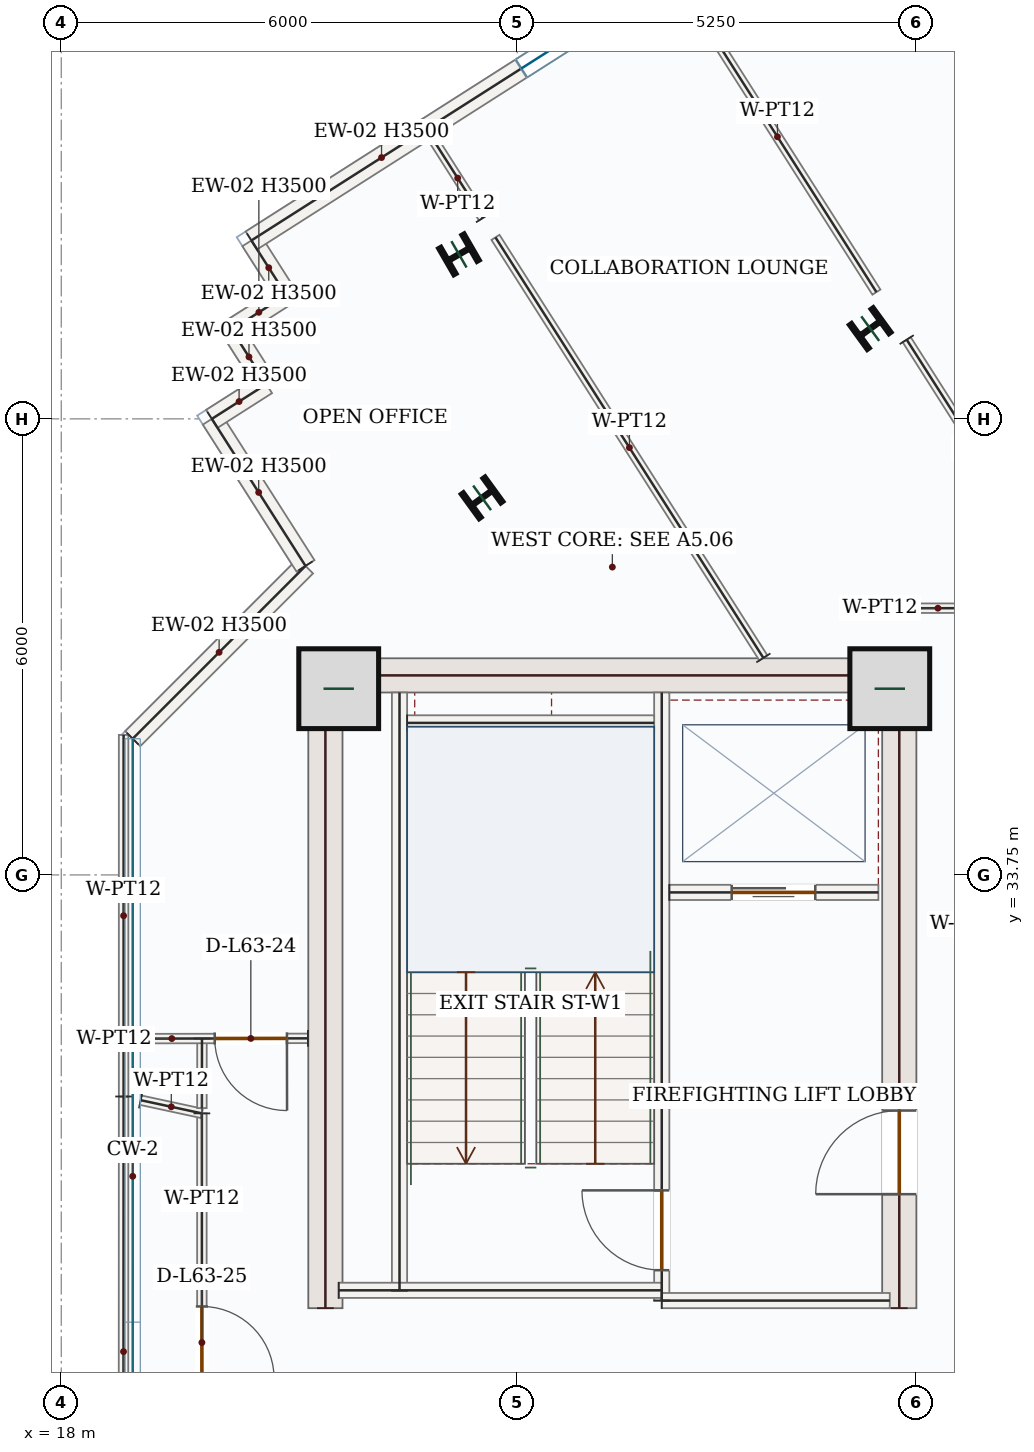
"""IFC4 building model, lengths in metres.
Left out: names, types, materials, properties, quantities, classifications, styles, units other than length and angle.
Written with IfcOpenShell. Run it as: python <this file> out.ifc"""

import sys

from ifc_helpers import new_model, si_unit, direction, frame, frame_2d, origin, origin_2d, place, context, subcontext, project, spatial, rectangle, i_section, extrude, source, transform, mapped, element, fill, save


model = new_model("IFC4")
c1 = context("Model", 3, precision=1e-05, world=origin(), true_north=direction((0.0, 1.0)))
c2 = subcontext(c1, "Body", "Model", "MODEL_VIEW")
j1 = project(units=[si_unit("LENGTHUNIT", "METRE"), si_unit("PLANEANGLEUNIT", "RADIAN")], contexts=[c1])
p1 = place(None, origin())
s1 = spatial("IfcSite", under=j1, at=p1, CompositionType="ELEMENT")
p2 = place(p1, origin())
s2 = spatial("IfcBuilding", under=s1, at=p2, CompositionType="ELEMENT")
p3 = place(p2, frame((0.0, 0.0, 265.35)))
s3 = spatial("IfcBuildingStorey", under=s2, at=p3, CompositionType="ELEMENT", Elevation=265.35)
m1 = source(origin(), c2, "Body", "SweptSolid", [
    extrude(rectangle(XDim=8.55, YDim=0.45, at=frame_2d((4.275, 0.0))), origin(), (0.0, 0.0, 1.0), 3.5),
])
p4 = place(p3, frame((21.475, 28.05, 0.0), z_axis=(0.0, 0.0, 1.0), x_axis=(0.0, 1.0, 0.0)))
e1 = element("IfcWall", 1, at=p4, inside=s3, PredefinedType="SHEAR", context=c2, shape_type="MappedRepresentation", body=[
    mapped(m1, transform((0.0, 0.0, 0.0), x_axis=(1.0, 0.0, 0.0), y_axis=(0.0, 1.0, 0.0), z_axis=(0.0, 0.0, 1.0), scale=1.0)),
])
p5 = place(p3, frame((29.025, 28.05, 0.0), z_axis=(0.0, 0.0, 1.0), x_axis=(0.0, 1.0, 0.0)))
e2 = element("IfcWall", 2, at=p5, inside=s3, PredefinedType="SHEAR", context=c2, shape_type="SweptSolid", body=[
    extrude(rectangle(XDim=8.55, YDim=0.45, at=frame_2d((4.275, 0.0))), origin(), (0.0, 0.0, 1.0), 3.5),
])
p6 = place(p5, frame((1.5, 0.0, 0.0)))
e3 = element("IfcOpeningElement", 3, at=p6, cuts=e2, PredefinedType="OPENING", context=c2, shape_type="SweptSolid", body=[
    extrude(rectangle(XDim=1.1, YDim=2.2, at=frame_2d((0.55, 1.1))), frame((0.0, 0.235, 0.0), z_axis=(0.0, -1.0, 0.0), x_axis=(1.0, 0.0, 0.0)), (0.0, 0.0, 1.0), 0.47),
])
m2 = source(origin(), c2, "Body", "SweptSolid", [
    extrude(rectangle(XDim=7.1, YDim=0.45, at=frame_2d((3.55, 0.0))), origin(), (0.0, 0.0, 1.0), 3.5),
])
p7 = place(p3, frame((21.7, 36.375, 0.0), z_axis=(0.0, 0.0, 1.0), x_axis=(1.0, 0.0, 0.0)))
e4 = element("IfcWall", 4, at=p7, inside=s3, PredefinedType="SHEAR", context=c2, shape_type="MappedRepresentation", body=[
    mapped(m2, transform((0.0, 0.0, 0.0), x_axis=(1.0, 0.0, 0.0), y_axis=(0.0, 1.0, 0.0), z_axis=(0.0, 0.0, 1.0), scale=1.0)),
])
m3 = source(origin(), c2, "Body", "SweptSolid", [
    extrude(rectangle(XDim=1.05, YDim=1.05, at=origin_2d()), origin(), (0.0, 0.0, 1.0), 3.75),
])
for number, where, z_axis, x_axis in (
    (5, (21.65, 36.2, 0.0), (0.0, 0.0, 1.0), (1.0, 0.0, 0.0)),
    (6, (28.9, 36.2, 0.0), (0.0, 0.0, 1.0), (1.0, 0.0, 0.0)),
):
    element("IfcColumn", number, at=place(p3, frame(where, z_axis=z_axis, x_axis=x_axis)), inside=s3, PredefinedType="COLUMN", context=c2, shape_type="MappedRepresentation", body=[
        mapped(m3, transform((0.0, 0.0, 0.0), x_axis=(1.0, 0.0, 0.0), y_axis=(0.0, 1.0, 0.0), z_axis=(0.0, 0.0, 1.0), scale=1.0)),
    ])
m4 = source(origin(), c2, "Body", "SweptSolid", [
    extrude(i_section(OverallWidth=0.399, OverallDepth=0.386, WebThickness=0.021, FlangeThickness=0.033, FilletRadius=0.018, at=origin_2d()), origin(), (0.0, 0.0, 1.0), 3.75),
])
for number, where, z_axis, x_axis in (
    (7, (28.643, 40.937, 0.0), (0.0, 0.0, 1.0), (-0.588, 0.809, 0.0)),
    (8, (23.536, 38.711, 0.0), (0.0, 0.0, 1.0), (-0.588, 0.809, 0.0)),
    (9, (23.232, 41.914, 0.0), (0.0, 0.0, 1.0), (-0.5, 0.866, 0.0)),
):
    element("IfcColumn", number, at=place(p3, frame(where, z_axis=z_axis, x_axis=x_axis)), inside=s3, PredefinedType="COLUMN", context=c2, shape_type="MappedRepresentation", body=[
        mapped(m4, transform((0.0, 0.0, 0.0), x_axis=(1.0, 0.0, 0.0), y_axis=(0.0, 1.0, 0.0), z_axis=(0.0, 0.0, 1.0), scale=1.0)),
    ])
m5 = source(origin(), c2, "Body", "SweptSolid", [
    extrude(rectangle(XDim=3.215, YDim=0.28, at=frame_2d((1.607, 0.0))), origin(), (0.0, 0.0, 1.0), 3.5),
])
p8 = place(p3, frame((18.94, 35.542, 0.0), z_axis=(0.0, 0.0, 1.0), x_axis=(0.707106781187, 0.707106781187, 0.0)))
e10 = element("IfcWall", 10, at=p8, inside=s3, PredefinedType="SOLIDWALL", context=c2, shape_type="MappedRepresentation", body=[
    mapped(m5, transform((0.0, 0.0, 0.0), x_axis=(1.0, 0.0, 0.0), y_axis=(0.0, 1.0, 0.0), z_axis=(0.0, 0.0, 1.0), scale=1.0)),
])
m6 = source(origin(), c2, "Body", "SweptSolid", [
    extrude(rectangle(XDim=2.293, YDim=0.28, at=frame_2d((1.147, 0.0))), origin(), (0.0, 0.0, 1.0), 3.5),
])
p9 = place(p3, frame((21.213, 37.815, 0.0), z_axis=(0.0, 0.0, 1.0), x_axis=(-0.53726116654, 0.843415934713, 0.0)))
e11 = element("IfcWall", 11, at=p9, inside=s3, PredefinedType="SOLIDWALL", context=c2, shape_type="MappedRepresentation", body=[
    mapped(m6, transform((0.0, 0.0, 0.0), x_axis=(1.0, 0.0, 0.0), y_axis=(0.0, 1.0, 0.0), z_axis=(0.0, 0.0, 1.0), scale=1.0)),
])
m7 = source(origin(), c2, "Body", "SweptSolid", [
    extrude(rectangle(XDim=0.85, YDim=0.28, at=frame_2d((0.425, 0.0))), origin(), (0.0, 0.0, 1.0), 3.5),
])
for number, where, z_axis, x_axis in (
    (12, (19.981, 39.75, 0.0), (0.0, 0.0, 1.0), (0.843, 0.537, 0.0)),
    (13, (20.698, 40.206, 0.0), (0.0, 0.0, 1.0), (-0.537, 0.843, 0.0)),
    (14, (20.241, 40.923, 0.0), (0.0, 0.0, 1.0), (0.843, 0.537, 0.0)),
    (15, (20.958, 41.38, 0.0), (0.0, 0.0, 1.0), (-0.537, 0.843, 0.0)),
):
    element("IfcWall", number, at=place(p3, frame(where, z_axis=z_axis, x_axis=x_axis)), inside=s3, PredefinedType="SOLIDWALL", context=c2, shape_type="MappedRepresentation", body=[
        mapped(m7, transform((0.0, 0.0, 0.0), x_axis=(1.0, 0.0, 0.0), y_axis=(0.0, 1.0, 0.0), z_axis=(0.0, 0.0, 1.0), scale=1.0)),
    ])
p10 = place(p3, frame((20.501, 42.097, 0.0), z_axis=(0.0, 0.0, 1.0), x_axis=(0.843388777764, 0.537303796322, 0.0)))
e16 = element("IfcWall", 16, at=p10, inside=s3, PredefinedType="SOLIDWALL", context=c2, shape_type="SweptSolid", body=[
    extrude(rectangle(XDim=9.92, YDim=0.28, at=frame_2d((4.96, 0.0))), origin(), (0.0, 0.0, 1.0), 3.5),
])
p11 = place(p10, frame((4.21, 0.0, 0.85)))
e17 = element("IfcOpeningElement", 17, at=p11, cuts=e16, PredefinedType="OPENING", context=c2, shape_type="SweptSolid", body=[
    extrude(rectangle(XDim=1.5, YDim=1.5, at=frame_2d((0.75, 0.75))), frame((0.0, 0.15, 0.0), z_axis=(0.0, -1.0, 0.0), x_axis=(1.0, 0.0, 0.0)), (0.0, 0.0, 1.0), 0.3),
])
m8 = source(origin(), c2, "Body", "SweptSolid", [
    extrude(rectangle(XDim=7.87, YDim=0.2, at=frame_2d((3.935, 0.0))), origin(), (0.0, 0.0, 1.0), 3.5),
])
p12 = place(p3, frame((22.45, 28.28, 0.0), z_axis=(0.0, 0.0, 1.0), x_axis=(0.0, 1.0, 0.0)))
e18 = element("IfcWall", 18, at=p12, inside=s3, PredefinedType="SOLIDWALL", context=c2, shape_type="MappedRepresentation", body=[
    mapped(m8, transform((0.0, 0.0, 0.0), x_axis=(1.0, 0.0, 0.0), y_axis=(0.0, 1.0, 0.0), z_axis=(0.0, 0.0, 1.0), scale=1.0)),
])
p13 = place(p3, frame((25.9, 28.15, 0.0), z_axis=(0.0, 0.0, 1.0), x_axis=(0.0, 1.0, 0.0)))
e19 = element("IfcWall", 19, at=p13, inside=s3, PredefinedType="SOLIDWALL", context=c2, shape_type="SweptSolid", body=[
    extrude(rectangle(XDim=8.0, YDim=0.2, at=frame_2d((4.0, 0.0))), origin(), (0.0, 0.0, 1.0), 3.5),
])
p14 = place(p13, frame((0.4, 0.0, 0.0)))
e20 = element("IfcOpeningElement", 20, at=p14, cuts=e19, PredefinedType="OPENING", context=c2, shape_type="SweptSolid", body=[
    extrude(rectangle(XDim=1.05, YDim=2.15, at=frame_2d((0.525, 1.075))), frame((0.0, 0.11, 0.0), z_axis=(0.0, -1.0, 0.0), x_axis=(1.0, 0.0, 0.0)), (0.0, 0.0, 1.0), 0.22),
])
m9 = source(origin(), c2, "Body", "SweptSolid", [
    extrude(rectangle(XDim=4.25, YDim=0.2, at=frame_2d((2.125, 0.0))), origin(), (0.0, 0.0, 1.0), 3.5),
])
p15 = place(p3, frame((21.65, 28.285, 0.0), z_axis=(0.0, 0.0, 1.0), x_axis=(1.0, 0.0, 0.0)))
e21 = element("IfcWall", 21, at=p15, inside=s3, PredefinedType="SOLIDWALL", context=c2, shape_type="MappedRepresentation", body=[
    mapped(m9, transform((0.0, 0.0, 0.0), x_axis=(1.0, 0.0, 0.0), y_axis=(0.0, 1.0, 0.0), z_axis=(0.0, 0.0, 1.0), scale=1.0)),
])
m10 = source(origin(), c2, "Body", "SweptSolid", [
    extrude(rectangle(XDim=3.0, YDim=0.2, at=frame_2d((1.5, 0.0))), origin(), (0.0, 0.0, 1.0), 3.5),
])
p16 = place(p3, frame((25.9, 28.15, 0.0), z_axis=(0.0, 0.0, 1.0), x_axis=(1.0, 0.0, 0.0)))
e22 = element("IfcWall", 22, at=p16, inside=s3, PredefinedType="SOLIDWALL", context=c2, shape_type="MappedRepresentation", body=[
    mapped(m10, transform((0.0, 0.0, 0.0), x_axis=(1.0, 0.0, 0.0), y_axis=(0.0, 1.0, 0.0), z_axis=(0.0, 0.0, 1.0), scale=1.0)),
])
m11 = source(origin(), c2, "Body", "SweptSolid", [
    extrude(rectangle(XDim=3.25, YDim=0.2, at=frame_2d((1.625, 0.0))), origin(), (0.0, 0.0, 1.0), 3.5),
])
p17 = place(p3, frame((22.55, 35.75, 0.0), z_axis=(0.0, 0.0, 1.0), x_axis=(1.0, 0.0, 0.0)))
e23 = element("IfcWall", 23, at=p17, inside=s3, PredefinedType="SOLIDWALL", context=c2, shape_type="MappedRepresentation", body=[
    mapped(m11, transform((0.0, 0.0, 0.0), x_axis=(1.0, 0.0, 0.0), y_axis=(0.0, 1.0, 0.0), z_axis=(0.0, 0.0, 1.0), scale=1.0)),
])
p18 = place(p3, frame((26.0, 33.52, 0.0), z_axis=(0.0, 0.0, 1.0), x_axis=(1.0, 0.0, 0.0)))
e24 = element("IfcWall", 24, at=p18, inside=s3, PredefinedType="SOLIDWALL", context=c2, shape_type="SweptSolid", body=[
    extrude(rectangle(XDim=2.75, YDim=0.2, at=frame_2d((1.375, 0.0))), origin(), (0.0, 0.0, 1.0), 3.5),
])
p19 = place(p18, frame((0.82, 0.0, 0.0)))
e25 = element("IfcOpeningElement", 25, at=p19, cuts=e24, PredefinedType="OPENING", context=c2, shape_type="SweptSolid", body=[
    extrude(rectangle(XDim=1.1, YDim=2.15, at=frame_2d((0.55, 1.075))), frame((0.0, 0.11, 0.0), z_axis=(0.0, -1.0, 0.0), x_axis=(1.0, 0.0, 0.0)), (0.0, 0.0, 1.0), 0.22),
])
m12 = source(origin(), c2, "Body", "SweptSolid", [
    extrude(rectangle(XDim=4.188, YDim=0.125, at=frame_2d((2.094, 0.0))), origin(), (0.0, 0.0, 1.0), 3.5),
])
p20 = place(p3, frame((29.123, 40.792, 0.0), z_axis=(0.0, 0.0, 1.0), x_axis=(0.537264008944, -0.843414124078, 0.0)))
e26 = element("IfcWall", 26, at=p20, inside=s3, PredefinedType="PARTITIONING", context=c2, shape_type="MappedRepresentation", body=[
    mapped(m12, transform((0.0, 0.0, 0.0), x_axis=(1.0, 0.0, 0.0), y_axis=(0.0, 1.0, 0.0), z_axis=(0.0, 0.0, 1.0), scale=1.0)),
])
p21 = place(p3, frame((31.292, 37.26, 0.0), z_axis=(0.0, 0.0, 1.0), x_axis=(-0.999999820546, -0.000599089277, 0.0)))
e27 = element("IfcWall", 27, at=p21, inside=s3, PredefinedType="PARTITIONING", context=c2, shape_type="SweptSolid", body=[
    extrude(rectangle(XDim=2.038, YDim=0.125, at=frame_2d((1.019, 0.0))), origin(), (0.0, 0.0, 1.0), 3.5),
])
p22 = place(p21, frame((0.381, 0.0, 0.0)))
e28 = element("IfcOpeningElement", 28, at=p22, cuts=e27, PredefinedType="OPENING", context=c2, shape_type="SweptSolid", body=[
    extrude(rectangle(XDim=0.95, YDim=2.15, at=frame_2d((0.475, 1.075))), frame((0.0, 0.073, 0.0), z_axis=(0.0, -1.0, 0.0), x_axis=(1.0, 0.0, 0.0)), (0.0, 0.0, 1.0), 0.145),
])
m13 = source(origin(), c2, "Body", "SweptSolid", [
    extrude(rectangle(XDim=6.56, YDim=0.125, at=frame_2d((3.28, 0.0))), origin(), (0.0, 0.0, 1.0), 3.5),
])
p23 = place(p3, frame((27.237, 36.605, 0.0), z_axis=(0.0, 0.0, 1.0), x_axis=(-0.537282422054, 0.843402394443, 0.0)))
e29 = element("IfcWall", 29, at=p23, inside=s3, PredefinedType="PARTITIONING", context=c2, shape_type="MappedRepresentation", body=[
    mapped(m13, transform((0.0, 0.0, 0.0), x_axis=(1.0, 0.0, 0.0), y_axis=(0.0, 1.0, 0.0), z_axis=(0.0, 0.0, 1.0), scale=1.0)),
])
m14 = source(origin(), c2, "Body", "SweptSolid", [
    extrude(rectangle(XDim=1.241, YDim=0.125, at=frame_2d((0.621, 0.0))), origin(), (0.0, 0.0, 1.0), 3.5),
])
p24 = place(p3, frame((23.549, 42.394, 0.0), z_axis=(0.0, 0.0, 1.0), x_axis=(-0.537244446477, 0.843426585264, 0.0)))
e30 = element("IfcWall", 30, at=p24, inside=s3, PredefinedType="PARTITIONING", context=c2, shape_type="MappedRepresentation", body=[
    mapped(m14, transform((0.0, 0.0, 0.0), x_axis=(1.0, 0.0, 0.0), y_axis=(0.0, 1.0, 0.0), z_axis=(0.0, 0.0, 1.0), scale=1.0)),
])
m15 = source(origin(), c2, "Body", "SweptSolid", [
    extrude(rectangle(XDim=4.846, YDim=0.125, at=frame_2d((2.423, 0.0))), origin(), (0.0, 0.0, 1.0), 3.5),
])
p25 = place(p3, frame((26.12, 45.505, 0.0), z_axis=(0.0, 0.0, 1.0), x_axis=(0.537305688893, -0.843387572047, 0.0)))
e31 = element("IfcWall", 31, at=p25, inside=s3, PredefinedType="PARTITIONING", context=c2, shape_type="MappedRepresentation", body=[
    mapped(m15, transform((0.0, 0.0, 0.0), x_axis=(1.0, 0.0, 0.0), y_axis=(0.0, 1.0, 0.0), z_axis=(0.0, 0.0, 1.0), scale=1.0)),
])
p26 = place(p3, frame((19.85, 30.613, 0.0), z_axis=(0.0, 0.0, 1.0), x_axis=(0.0, -1.0, 0.0)))
e32 = element("IfcWall", 32, at=p26, inside=s3, PredefinedType="PARTITIONING", context=c2, shape_type="SweptSolid", body=[
    extrude(rectangle(XDim=8.207, YDim=0.125, at=frame_2d((4.104, 0.0))), origin(), (0.0, 0.0, 1.0), 3.5),
])
p27 = place(p26, frame((2.54, 0.0, 0.0)))
e33 = element("IfcOpeningElement", 33, at=p27, cuts=e32, PredefinedType="OPENING", context=c2, shape_type="SweptSolid", body=[
    extrude(rectangle(XDim=0.95, YDim=2.15, at=frame_2d((0.475, 1.075))), frame((0.0, 0.073, 0.0), z_axis=(0.0, -1.0, 0.0), x_axis=(1.0, 0.0, 0.0)), (0.0, 0.0, 1.0), 0.145),
])
m16 = source(origin(), c2, "Body", "SweptSolid", [
    extrude(rectangle(XDim=6.713, YDim=0.125, at=frame_2d((3.356, 0.0))), origin(), (0.0, 0.0, 1.0), 3.5),
])
p28 = place(p3, frame((18.818, 24.122, 0.0), z_axis=(0.0, 0.0, 1.0), x_axis=(0.000327332225, 0.999999946427, 0.0)))
e34 = element("IfcWall", 34, at=p28, inside=s3, PredefinedType="PARTITIONING", context=c2, shape_type="MappedRepresentation", body=[
    mapped(m16, transform((0.0, 0.0, 0.0), x_axis=(1.0, 0.0, 0.0), y_axis=(0.0, 1.0, 0.0), z_axis=(0.0, 0.0, 1.0), scale=1.0)),
])
m17 = source(origin(), c2, "Body", "SweptSolid", [
    extrude(rectangle(XDim=0.824, YDim=0.125, at=frame_2d((0.412, 0.0))), origin(), (0.0, 0.0, 1.0), 3.5),
])
p29 = place(p3, frame((19.045, 30.786, 0.0), z_axis=(0.0, 0.0, 1.0), x_axis=(0.977541402347, -0.210743461816, 0.0)))
e35 = element("IfcWall", 35, at=p29, inside=s3, PredefinedType="PARTITIONING", context=c2, shape_type="MappedRepresentation", body=[
    mapped(m17, transform((0.0, 0.0, 0.0), x_axis=(1.0, 0.0, 0.0), y_axis=(0.0, 1.0, 0.0), z_axis=(0.0, 0.0, 1.0), scale=1.0)),
])
m18 = source(origin(), c2, "Body", "SweptSolid", [
    extrude(rectangle(XDim=0.916, YDim=0.125, at=frame_2d((0.458, 0.0))), origin(), (0.0, 0.0, 1.0), 3.5),
])
p30 = place(p3, frame((19.851, 31.598, 0.0), z_axis=(0.0, 0.0, 1.0), x_axis=(-0.001332976688, -0.999999111586, 0.0)))
e36 = element("IfcWall", 36, at=p30, inside=s3, PredefinedType="PARTITIONING", context=c2, shape_type="MappedRepresentation", body=[
    mapped(m18, transform((0.0, 0.0, 0.0), x_axis=(1.0, 0.0, 0.0), y_axis=(0.0, 1.0, 0.0), z_axis=(0.0, 0.0, 1.0), scale=1.0)),
])
m19 = source(origin(), c2, "Body", "SweptSolid", [
    extrude(rectangle(XDim=4.757, YDim=0.125, at=frame_2d((2.378, 0.0))), origin(), (0.0, 0.0, 1.0), 3.5),
])
p31 = place(p3, frame((18.82, 30.835, 0.0), z_axis=(0.0, 0.0, 1.0), x_axis=(0.0, 1.0, 0.0)))
e37 = element("IfcWall", 37, at=p31, inside=s3, PredefinedType="PARTITIONING", context=c2, shape_type="MappedRepresentation", body=[
    mapped(m19, transform((0.0, 0.0, 0.0), x_axis=(1.0, 0.0, 0.0), y_axis=(0.0, 1.0, 0.0), z_axis=(0.0, 0.0, 1.0), scale=1.0)),
])
p32 = place(p3, frame((21.245, 31.6, 0.0), z_axis=(0.0, 0.0, 1.0), x_axis=(-0.999998798684, -0.001550042425, 0.0)))
e38 = element("IfcWall", 38, at=p32, inside=s3, PredefinedType="PARTITIONING", context=c2, shape_type="SweptSolid", body=[
    extrude(rectangle(XDim=2.205, YDim=0.125, at=frame_2d((1.103, 0.0))), origin(), (0.0, 0.0, 1.0), 3.5),
])
p33 = place(p32, frame((0.276, 0.0, 0.0)))
e39 = element("IfcOpeningElement", 39, at=p33, cuts=e38, PredefinedType="OPENING", context=c2, shape_type="SweptSolid", body=[
    extrude(rectangle(XDim=0.95, YDim=2.15, at=frame_2d((0.475, 1.075))), frame((0.0, 0.073, 0.0), z_axis=(0.0, -1.0, 0.0), x_axis=(1.0, 0.0, 0.0)), (0.0, 0.0, 1.0), 0.145),
])
m20 = source(origin(), c2, "Body", "SweptSolid", [
    extrude(rectangle(XDim=1.5, YDim=1.5, at=frame_2d((0.75, 0.75))), frame((0.0, 0.03, 0.0), z_axis=(0.0, -1.0, 0.0), x_axis=(1.0, 0.0, 0.0)), (0.0, 0.0, 1.0), 0.06),
])
p34 = place(p11, origin())
e40 = element("IfcWindow", 40, at=p34, inside=s3, PartitioningType="SINGLE_PANEL", PredefinedType="WINDOW", context=c2, shape_type="MappedRepresentation", body=[
    mapped(m20, transform((0.0, 0.0, 0.0), x_axis=(1.0, 0.0, 0.0), y_axis=(0.0, 1.0, 0.0), z_axis=(0.0, 0.0, 1.0), scale=1.0)),
])
fill(e17, e40)
m21 = source(origin(), c2, "Body", "SweptSolid", [
    extrude(rectangle(XDim=1.05, YDim=2.15, at=frame_2d((0.525, 1.075))), frame((0.0, 0.025, 0.0), z_axis=(0.0, -1.0, 0.0), x_axis=(1.0, 0.0, 0.0)), (0.0, 0.0, 1.0), 0.05),
])
p35 = place(p14, origin())
e41 = element("IfcDoor", 41, at=p35, inside=s3, OperationType="SINGLE_SWING_RIGHT", PredefinedType="DOOR", context=c2, shape_type="MappedRepresentation", body=[
    mapped(m21, transform((0.0, 0.0, 0.0), x_axis=(1.0, 0.0, 0.0), y_axis=(0.0, 1.0, 0.0), z_axis=(0.0, 0.0, 1.0), scale=1.0)),
])
fill(e20, e41)
m22 = source(origin(), c2, "Body", "SweptSolid", [
    extrude(rectangle(XDim=1.1, YDim=2.15, at=frame_2d((0.55, 1.075))), frame((0.0, 0.025, 0.0), z_axis=(0.0, -1.0, 0.0), x_axis=(1.0, 0.0, 0.0)), (0.0, 0.0, 1.0), 0.05),
])
p36 = place(p19, origin())
e42 = element("IfcDoor", 42, at=p36, inside=s3, OperationType="DOUBLE_DOOR_SLIDING", PredefinedType="DOOR", context=c2, shape_type="MappedRepresentation", body=[
    mapped(m22, transform((0.0, 0.0, 0.0), x_axis=(1.0, 0.0, 0.0), y_axis=(0.0, 1.0, 0.0), z_axis=(0.0, 0.0, 1.0), scale=1.0)),
])
fill(e25, e42)
m23 = source(origin(), c2, "Body", "SweptSolid", [
    extrude(rectangle(XDim=1.1, YDim=2.2, at=frame_2d((0.55, 1.1))), frame((0.0, 0.025, 0.0), z_axis=(0.0, -1.0, 0.0), x_axis=(1.0, 0.0, 0.0)), (0.0, 0.0, 1.0), 0.05),
])
p37 = place(p6, origin())
e43 = element("IfcDoor", 43, at=p37, inside=s3, OperationType="SINGLE_SWING_LEFT", PredefinedType="DOOR", context=c2, shape_type="MappedRepresentation", body=[
    mapped(m23, transform((0.0, 0.0, 0.0), x_axis=(1.0, 0.0, 0.0), y_axis=(0.0, 1.0, 0.0), z_axis=(0.0, 0.0, 1.0), scale=1.0)),
])
fill(e3, e43)
m24 = source(origin(), c2, "Body", "SweptSolid", [
    extrude(rectangle(XDim=0.95, YDim=2.15, at=frame_2d((0.475, 1.075))), frame((0.0, 0.025, 0.0), z_axis=(0.0, -1.0, 0.0), x_axis=(1.0, 0.0, 0.0)), (0.0, 0.0, 1.0), 0.05),
])
p38 = place(p33, origin())
e44 = element("IfcDoor", 44, at=p38, inside=s3, OperationType="SINGLE_SWING_LEFT", PredefinedType="DOOR", context=c2, shape_type="MappedRepresentation", body=[
    mapped(m24, transform((0.0, 0.0, 0.0), x_axis=(1.0, 0.0, 0.0), y_axis=(0.0, 1.0, 0.0), z_axis=(0.0, 0.0, 1.0), scale=1.0)),
])
fill(e39, e44)
p39 = place(p27, origin())
e45 = element("IfcDoor", 45, at=p39, inside=s3, OperationType="SINGLE_SWING_RIGHT", PredefinedType="DOOR", context=c2, shape_type="MappedRepresentation", body=[
    mapped(m24, transform((0.0, 0.0, 0.0), x_axis=(1.0, 0.0, 0.0), y_axis=(0.0, 1.0, 0.0), z_axis=(0.0, 0.0, 1.0), scale=1.0)),
])
fill(e33, e45)
save(model, sys.argv[1])
